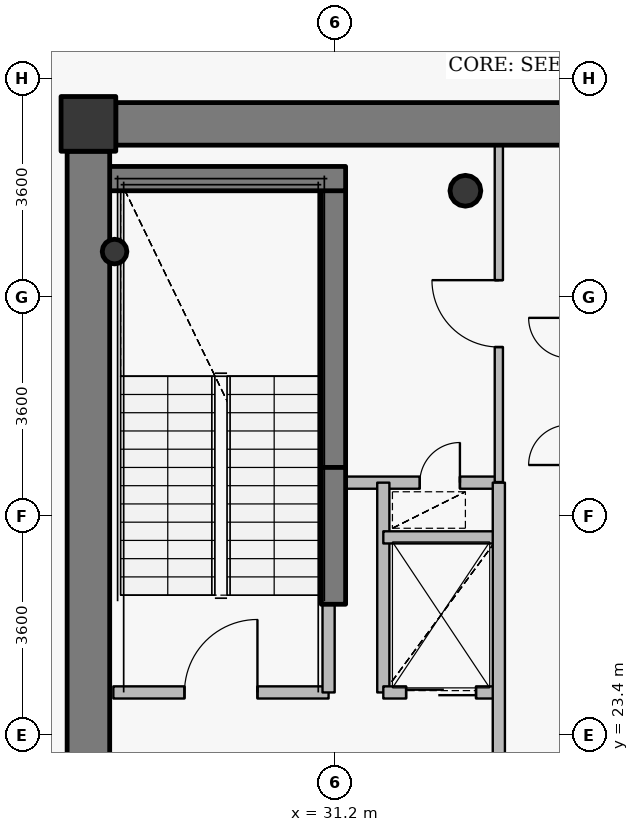
"""IFC4 building model, lengths in metres.
Left out: names, types, materials, properties, quantities, classifications, styles, units other than length and angle.
Written with IfcOpenShell. Run it as: python <this file> out.ifc"""

import sys

from ifc_helpers import new_model, si_unit, direction, frame, frame_2d, origin, origin_2d, place, context, subcontext, project, spatial, rectangle, hollow_circle, extrude, source, transform, mapped, element, fill, save


model = new_model("IFC4")
c1 = context("Model", 3, precision=1e-05, world=origin(), true_north=direction((0.0, 1.0)))
c2 = subcontext(c1, "Body", "Model", "MODEL_VIEW")
j1 = project(units=[si_unit("LENGTHUNIT", "METRE"), si_unit("PLANEANGLEUNIT", "RADIAN")], contexts=[c1])
p1 = place(None, origin())
s1 = spatial("IfcSite", under=j1, at=p1, CompositionType="ELEMENT")
p2 = place(p1, origin())
s2 = spatial("IfcBuilding", under=s1, at=p2, CompositionType="ELEMENT")
p3 = place(p2, frame((0.0, 0.0, 327.8)))
s3 = spatial("IfcBuildingStorey", under=s2, at=p3, CompositionType="ELEMENT", Elevation=327.8)
p4 = place(p3, frame((27.15, 33.45, 0.0), z_axis=(0.0, 0.0, 1.0), x_axis=(1.0, 0.0, 0.0)))
e1 = element("IfcColumn", 1, at=p4, inside=s3, PredefinedType="COLUMN", context=c2, shape_type="SweptSolid", body=[
    extrude(rectangle(XDim=0.9, YDim=0.9, at=origin_2d()), origin(), (0.0, 0.0, 1.0), 3.8),
])
p5 = place(p3, frame((33.35, 32.35, 0.0), z_axis=(0.0, 0.0, 1.0), x_axis=(1.0, 0.0, 0.0)))
e2 = element("IfcColumn", 2, at=p5, inside=s3, PredefinedType="COLUMN", context=c2, shape_type="SweptSolid", body=[
    extrude(hollow_circle(Radius=0.254, WallThickness=0.02, at=origin_2d()), origin(), (0.0, 0.0, 1.0), 3.8),
])
p6 = place(p3, frame((31.18, 27.8, 0.0), z_axis=(0.0, 0.0, 1.0), x_axis=(0.0, 1.0, 0.0)))
e3 = element("IfcWall", 3, at=p6, inside=s3, PredefinedType="SHEAR", context=c2, shape_type="SweptSolid", body=[
    extrude(rectangle(XDim=4.75, YDim=0.4, at=frame_2d((2.375, 0.0))), origin(), (0.0, 0.0, 1.0), 3.8),
])
p7 = place(p3, frame((27.25, 32.55, 0.0), z_axis=(0.0, 0.0, 1.0), x_axis=(1.0, 0.0, 0.0)))
e4 = element("IfcWall", 4, at=p7, inside=s3, PredefinedType="SHEAR", context=c2, shape_type="SweptSolid", body=[
    extrude(rectangle(XDim=4.13, YDim=0.4, at=frame_2d((2.065, 0.0))), origin(), (0.0, 0.0, 1.0), 3.8),
])
p8 = place(p3, frame((27.58, 31.35, 0.0), z_axis=(0.0, 0.0, 1.0), x_axis=(1.0, 0.0, 0.0)))
e5 = element("IfcColumn", 5, at=p8, inside=s3, PredefinedType="COLUMN", context=c2, shape_type="SweptSolid", body=[
    extrude(hollow_circle(Radius=0.203, WallThickness=0.016, at=origin_2d()), origin(), (0.0, 0.0, 1.0), 3.8),
])
p9 = place(p3, frame((27.6, 33.45, 0.0), z_axis=(0.0, 0.0, 1.0), x_axis=(1.0, 0.0, 0.0)))
e6 = element("IfcWall", 6, at=p9, inside=s3, PredefinedType="SHEAR", context=c2, shape_type="SweptSolid", body=[
    extrude(rectangle(XDim=16.8, YDim=0.7, at=frame_2d((8.4, 0.0))), origin(), (0.0, 0.0, 1.0), 3.1),
])
p10 = place(p9, frame((12.85, 0.0, 0.0)))
e7 = element("IfcOpeningElement", 7, at=p10, cuts=e6, PredefinedType="OPENING", context=c2, shape_type="SweptSolid", body=[
    extrude(rectangle(XDim=1.15, YDim=2.15, at=origin_2d()), frame((0.575, 0.36, 1.075), z_axis=(0.0, -1.0, 0.0), x_axis=(1.0, 0.0, 0.0)), (0.0, 0.0, 1.0), 0.72),
])
p11 = place(p3, frame((27.15, 21.0, 0.0), z_axis=(0.0, 0.0, 1.0), x_axis=(0.0, 1.0, 0.0)))
e8 = element("IfcWall", 8, at=p11, inside=s3, PredefinedType="SHEAR", context=c2, shape_type="SweptSolid", body=[
    extrude(rectangle(XDim=12.0, YDim=0.7, at=frame_2d((6.0, 0.0))), origin(), (0.0, 0.0, 1.0), 3.1),
])
p12 = place(p3, frame((31.18, 25.55, 0.0), z_axis=(0.0, 0.0, 1.0), x_axis=(0.0, 1.0, 0.0)))
e9 = element("IfcWall", 9, at=p12, inside=s3, PredefinedType="SHEAR", context=c2, shape_type="SweptSolid", body=[
    extrude(rectangle(XDim=2.25, YDim=0.4, at=frame_2d((1.125, 0.0))), origin(), (0.0, 0.0, 1.0), 3.15),
])
p13 = place(p3, frame((27.56, 24.1, 0.0), z_axis=(0.0, 0.0, 1.0), x_axis=(1.0, 0.0, 0.0)))
e10 = element("IfcWall", 10, at=p13, inside=s3, PredefinedType="PARTITIONING", context=c2, shape_type="SweptSolid", body=[
    extrude(rectangle(XDim=3.54, YDim=0.2, at=frame_2d((1.77, 0.0))), origin(), (0.0, 0.0, 1.0), 3.55),
])
p14 = place(p13, frame((1.17, 0.0, 0.0)))
e11 = element("IfcOpeningElement", 11, at=p14, cuts=e10, PredefinedType="OPENING", context=c2, shape_type="SweptSolid", body=[
    extrude(rectangle(XDim=1.2, YDim=2.15, at=origin_2d()), frame((0.6, 0.11, 1.075), z_axis=(0.0, -1.0, 0.0), x_axis=(1.0, 0.0, 0.0)), (0.0, 0.0, 1.0), 0.22),
])
p15 = place(p3, frame((31.1, 24.1, 0.0), z_axis=(0.0, 0.0, 1.0), x_axis=(0.0, 1.0, 0.0)))
e12 = element("IfcWall", 12, at=p15, inside=s3, PredefinedType="PARTITIONING", context=c2, shape_type="SweptSolid", body=[
    extrude(rectangle(XDim=1.44, YDim=0.2, at=frame_2d((0.72, 0.0))), origin(), (0.0, 0.0, 1.0), 3.55),
])
p16 = place(p3, frame((31.1, 27.55, 0.0), z_axis=(0.0, 0.0, 1.0), x_axis=(1.0, 0.0, 0.0)))
e13 = element("IfcWall", 13, at=p16, inside=s3, PredefinedType="PARTITIONING", context=c2, shape_type="SweptSolid", body=[
    extrude(rectangle(XDim=2.8, YDim=0.2, at=frame_2d((1.4, 0.0))), origin(), (0.0, 0.0, 1.0), 3.135),
])
p17 = place(p16, frame((1.5, 0.0, 0.0)))
e14 = element("IfcOpeningElement", 14, at=p17, cuts=e13, PredefinedType="OPENING", context=c2, shape_type="SweptSolid", body=[
    extrude(rectangle(XDim=0.66, YDim=2.05, at=origin_2d()), frame((0.33, 0.11, 1.025), z_axis=(0.0, -1.0, 0.0), x_axis=(1.0, 0.0, 0.0)), (0.0, 0.0, 1.0), 0.22),
])
p18 = place(p3, frame((32.0, 24.1, 0.0), z_axis=(0.0, 0.0, 1.0), x_axis=(0.0, 1.0, 0.0)))
e15 = element("IfcWall", 15, at=p18, inside=s3, PredefinedType="PARTITIONING", context=c2, shape_type="SweptSolid", body=[
    extrude(rectangle(XDim=3.45, YDim=0.2, at=frame_2d((1.725, 0.0))), origin(), (0.0, 0.0, 1.0), 3.55),
])
p19 = place(p3, frame((32.0, 24.1, 0.0), z_axis=(0.0, 0.0, 1.0), x_axis=(1.0, 0.0, 0.0)))
e16 = element("IfcWall", 16, at=p19, inside=s3, PredefinedType="PARTITIONING", context=c2, shape_type="SweptSolid", body=[
    extrude(rectangle(XDim=1.9, YDim=0.2, at=frame_2d((0.95, 0.0))), origin(), (0.0, 0.0, 1.0), 3.135),
])
p20 = place(p19, frame((0.375, 0.0, 0.0)))
e17 = element("IfcOpeningElement", 17, at=p20, cuts=e16, PredefinedType="OPENING", context=c2, shape_type="SweptSolid", body=[
    extrude(rectangle(XDim=1.15, YDim=2.15, at=origin_2d()), frame((0.575, 0.11, 1.075), z_axis=(0.0, -1.0, 0.0), x_axis=(1.0, 0.0, 0.0)), (0.0, 0.0, 1.0), 0.22),
])
p21 = place(p3, frame((32.0, 26.65, 0.0), z_axis=(0.0, 0.0, 1.0), x_axis=(1.0, 0.0, 0.0)))
e18 = element("IfcWall", 18, at=p21, inside=s3, PredefinedType="PARTITIONING", context=c2, shape_type="SweptSolid", body=[
    extrude(rectangle(XDim=1.9, YDim=0.2, at=frame_2d((0.95, 0.0))), origin(), (0.0, 0.0, 1.0), 3.135),
])
p22 = place(p3, frame((33.9, 20.9, 0.0), z_axis=(0.0, 0.0, 1.0), x_axis=(0.0, 1.0, 0.0)))
e19 = element("IfcWall", 19, at=p22, inside=s3, PredefinedType="PARTITIONING", context=c2, shape_type="SweptSolid", body=[
    extrude(rectangle(XDim=6.65, YDim=0.2, at=frame_2d((3.325, 0.0))), origin(), (0.0, 0.0, 1.0), 3.135),
])
p23 = place(p3, frame((33.9, 27.56, 0.0), z_axis=(0.0, 0.0, 1.0), x_axis=(0.0, 1.0, 0.0)))
e20 = element("IfcWall", 20, at=p23, inside=s3, PredefinedType="PARTITIONING", context=c2, shape_type="SweptSolid", body=[
    extrude(rectangle(XDim=5.54, YDim=0.135, at=frame_2d((2.77, 0.0))), origin(), (0.0, 0.0, 1.0), 3.135),
])
p24 = place(p23, frame((2.22, 0.0, 0.0)))
e21 = element("IfcOpeningElement", 21, at=p24, cuts=e20, PredefinedType="OPENING", context=c2, shape_type="SweptSolid", body=[
    extrude(rectangle(XDim=1.1, YDim=2.15, at=origin_2d()), frame((0.55, 0.078, 1.075), z_axis=(0.0, -1.0, 0.0), x_axis=(1.0, 0.0, 0.0)), (0.0, 0.0, 1.0), 0.155),
])
p25 = place(p3, frame((27.59, 33.8, 0.0), z_axis=(0.0, 0.0, 1.0), x_axis=(-1.0, 0.0, 0.0)))
e22 = element("IfcWall", 22, at=p25, inside=s3, PredefinedType="PARTITIONING", context=c2, shape_type="SweptSolid", body=[
    extrude(rectangle(XDim=0.79, YDim=0.135, at=frame_2d((0.395, 0.0))), origin(), (0.0, 0.0, 1.0), 3.085),
])
p26 = place(p3, frame((26.8, 33.492, 0.0), z_axis=(0.0, 0.0, 1.0), x_axis=(0.0, -1.0, 0.0)))
e23 = element("IfcWall", 23, at=p26, inside=s3, PredefinedType="PARTITIONING", context=c2, shape_type="SweptSolid", body=[
    extrude(rectangle(XDim=0.482, YDim=0.135, at=frame_2d((0.241, 0.0))), origin(), (0.0, 0.0, 1.0), 3.55),
])
m1 = source(origin(), c2, "Body", "SweptSolid", [
    extrude(rectangle(XDim=1.2, YDim=2.15, at=origin_2d()), frame((0.6, 0.025, 1.075), z_axis=(0.0, -1.0, 0.0), x_axis=(1.0, 0.0, 0.0)), (0.0, 0.0, 1.0), 0.05),
])
p27 = place(p14, origin())
e24 = element("IfcDoor", 24, at=p27, inside=s3, OperationType="SINGLE_SWING_RIGHT", PredefinedType="DOOR", context=c2, shape_type="MappedRepresentation", body=[
    mapped(m1, transform((0.0, 0.0, 0.0), x_axis=(1.0, 0.0, 0.0), y_axis=(0.0, 1.0, 0.0), z_axis=(0.0, 0.0, 1.0), scale=1.0)),
])
fill(e11, e24)
m2 = source(origin(), c2, "Body", "SweptSolid", [
    extrude(rectangle(XDim=1.15, YDim=2.15, at=origin_2d()), frame((0.575, 0.025, 1.075), z_axis=(0.0, -1.0, 0.0), x_axis=(1.0, 0.0, 0.0)), (0.0, 0.0, 1.0), 0.05),
])
p28 = place(p20, origin())
e25 = element("IfcDoor", 25, at=p28, inside=s3, OperationType="DOUBLE_DOOR_SLIDING", PredefinedType="USERDEFINED", context=c2, shape_type="MappedRepresentation", body=[
    mapped(m2, transform((0.0, 0.0, 0.0), x_axis=(1.0, 0.0, 0.0), y_axis=(0.0, 1.0, 0.0), z_axis=(0.0, 0.0, 1.0), scale=1.0)),
])
fill(e17, e25)
m3 = source(origin(), c2, "Body", "SweptSolid", [
    extrude(rectangle(XDim=1.1, YDim=2.15, at=origin_2d()), frame((0.55, 0.025, 1.075), z_axis=(0.0, -1.0, 0.0), x_axis=(1.0, 0.0, 0.0)), (0.0, 0.0, 1.0), 0.05),
])
p29 = place(p24, origin())
e26 = element("IfcDoor", 26, at=p29, inside=s3, OperationType="SINGLE_SWING_RIGHT", PredefinedType="DOOR", context=c2, shape_type="MappedRepresentation", body=[
    mapped(m3, transform((0.0, 0.0, 0.0), x_axis=(1.0, 0.0, 0.0), y_axis=(0.0, 1.0, 0.0), z_axis=(0.0, 0.0, 1.0), scale=1.0)),
])
fill(e21, e26)
m4 = source(origin(), c2, "Body", "SweptSolid", [
    extrude(rectangle(XDim=0.66, YDim=2.05, at=origin_2d()), frame((0.33, 0.025, 1.025), z_axis=(0.0, -1.0, 0.0), x_axis=(1.0, 0.0, 0.0)), (0.0, 0.0, 1.0), 0.05),
])
p30 = place(p17, origin())
e27 = element("IfcDoor", 27, at=p30, inside=s3, OperationType="SINGLE_SWING_RIGHT", PredefinedType="USERDEFINED", context=c2, shape_type="MappedRepresentation", body=[
    mapped(m4, transform((0.0, 0.0, 0.0), x_axis=(1.0, 0.0, 0.0), y_axis=(0.0, 1.0, 0.0), z_axis=(0.0, 0.0, 1.0), scale=1.0)),
])
fill(e14, e27)
save(model, sys.argv[1])
